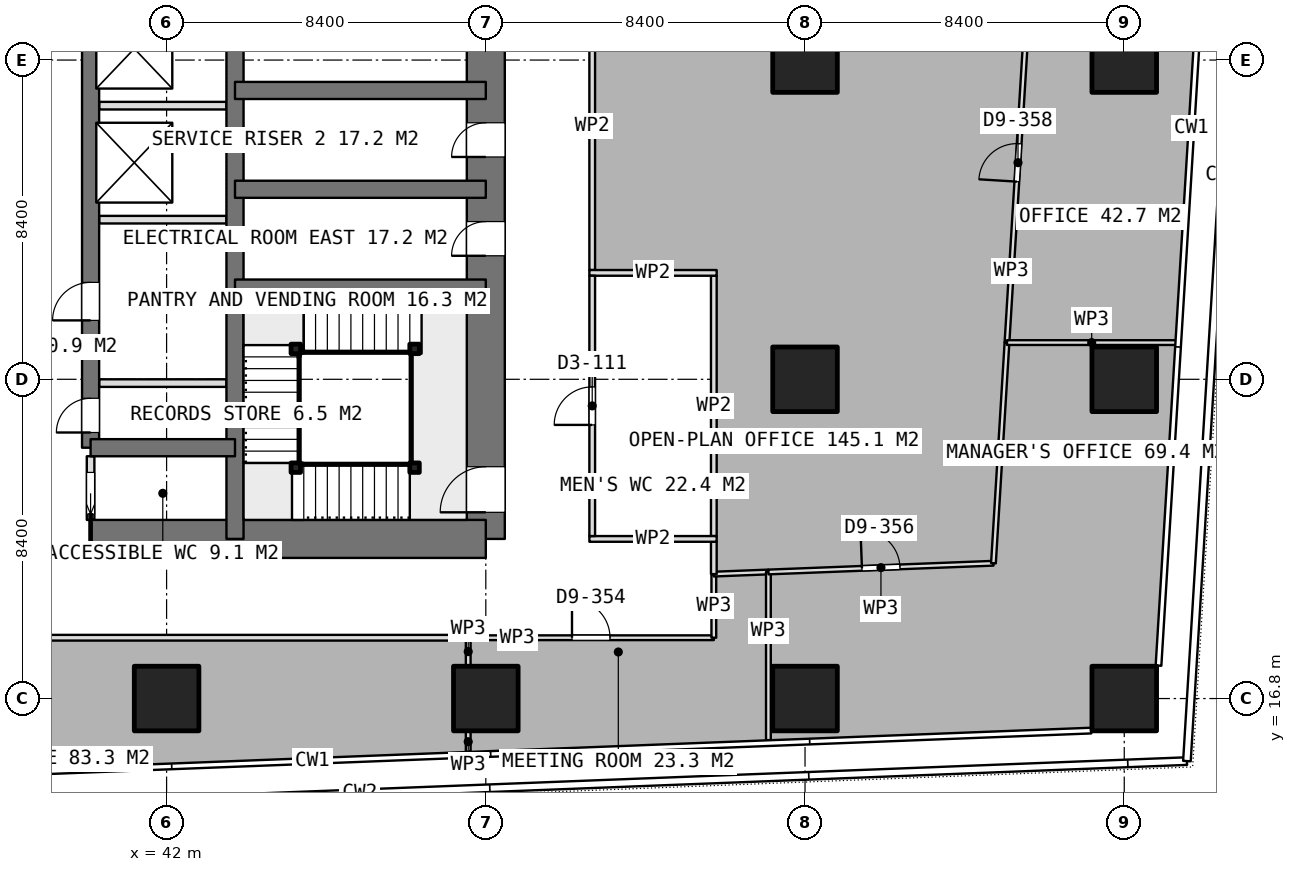
"""IFC4 building model, lengths in metres.
Left out: names, types, materials, properties, quantities, classifications, styles, units other than length and angle.
Written with IfcOpenShell. Run it as: python <this file> out.ifc"""

import sys

from ifc_helpers import new_model, si_unit, direction, frame, frame_2d, origin, origin_2d, place, context, subcontext, project, spatial, rectangle, extrude, element, fill, save


model = new_model("IFC4")
c1 = context("Model", 3, precision=1e-05, world=origin(), true_north=direction((0.0, 1.0)))
c2 = subcontext(c1, "Body", "Model", "MODEL_VIEW")
j1 = project(units=[si_unit("LENGTHUNIT", "METRE"), si_unit("PLANEANGLEUNIT", "RADIAN")], contexts=[c1])
p1 = place(None, origin())
s1 = spatial("IfcSite", under=j1, at=p1, CompositionType="ELEMENT")
p2 = place(p1, origin())
s2 = spatial("IfcBuilding", under=s1, at=p2, CompositionType="ELEMENT")
p3 = place(p2, frame((0.0, 0.0, 106.55)))
s3 = spatial("IfcBuildingStorey", under=s2, at=p3, CompositionType="ELEMENT", Elevation=106.55)
p4 = place(p3, frame((40.0, 21.0, 0.0), z_axis=(0.0, 0.0, 1.0), x_axis=(1.0, 0.0, 0.0)))
e1 = element("IfcWall", 1, at=p4, inside=s3, PredefinedType="SHEAR", context=c2, shape_type="SweptSolid", body=[
    extrude(rectangle(XDim=10.4, YDim=1.0, at=frame_2d((5.2, 0.0))), origin(), (0.0, 0.0, 1.0), 3.75),
])
p5 = place(p3, frame((50.4, 21.0, 0.0), z_axis=(0.0, 0.0, 1.0), x_axis=(0.0, 1.0, 0.0)))
e2 = element("IfcWall", 2, at=p5, inside=s3, PredefinedType="SHEAR", context=c2, shape_type="SweptSolid", body=[
    extrude(rectangle(XDim=25.2, YDim=1.0, at=frame_2d((12.6, 0.0))), origin(), (0.0, 0.0, 1.0), 3.75),
])
p6 = place(p5, frame((16.2, 0.0, 0.0)))
e3 = element("IfcOpeningElement", 3, at=p6, cuts=e2, PredefinedType="OPENING", context=c2, shape_type="SweptSolid", body=[
    extrude(rectangle(XDim=1.2, YDim=2.1, at=frame_2d((0.6, 1.05))), frame((0.0, 0.51, 0.0), z_axis=(0.0, -1.0, 0.0), x_axis=(1.0, 0.0, 0.0)), (0.0, 0.0, 1.0), 1.02),
])
p7 = place(p5, frame((10.05, 0.0, 0.0)))
e4 = element("IfcOpeningElement", 4, at=p7, cuts=e2, PredefinedType="OPENING", context=c2, shape_type="SweptSolid", body=[
    extrude(rectangle(XDim=0.9, YDim=2.1, at=frame_2d((0.45, 1.05))), frame((0.0, 0.51, 0.0), z_axis=(0.0, -1.0, 0.0), x_axis=(1.0, 0.0, 0.0)), (0.0, 0.0, 1.0), 1.02),
])
p8 = place(p5, frame((7.45, 0.0, 0.0)))
e5 = element("IfcOpeningElement", 5, at=p8, cuts=e2, PredefinedType="OPENING", context=c2, shape_type="SweptSolid", body=[
    extrude(rectangle(XDim=0.9, YDim=2.1, at=frame_2d((0.45, 1.05))), frame((0.0, 0.51, 0.0), z_axis=(0.0, -1.0, 0.0), x_axis=(1.0, 0.0, 0.0)), (0.0, 0.0, 1.0), 1.02),
])
p9 = place(p5, frame((0.7, 0.0, 0.0)))
e6 = element("IfcOpeningElement", 6, at=p9, cuts=e2, PredefinedType="OPENING", context=c2, shape_type="SweptSolid", body=[
    extrude(rectangle(XDim=1.2, YDim=2.1, at=frame_2d((0.6, 1.05))), frame((0.0, 0.51, 0.0), z_axis=(0.0, -1.0, 0.0), x_axis=(1.0, 0.0, 0.0)), (0.0, 0.0, 1.0), 1.02),
])
p10 = place(p3, frame((43.8, 21.0, 0.0), z_axis=(0.0, 0.0, 1.0), x_axis=(0.0, 1.0, 0.0)))
e7 = element("IfcWall", 7, at=p10, inside=s3, PredefinedType="SHEAR", context=c2, shape_type="SweptSolid", body=[
    extrude(rectangle(XDim=25.2, YDim=0.45, at=frame_2d((12.6, 0.0))), origin(), (0.0, 0.0, 1.0), 3.75),
])
p11 = place(p3, frame((40.0, 23.4, 0.0), z_axis=(0.0, 0.0, 1.0), x_axis=(0.0, 1.0, 0.0)))
e8 = element("IfcWall", 8, at=p11, inside=s3, PredefinedType="SHEAR", context=c2, shape_type="SweptSolid", body=[
    extrude(rectangle(XDim=18.0, YDim=0.45, at=frame_2d((9.0, 0.0))), origin(), (0.0, 0.0, 1.0), 3.75),
])
p12 = place(p11, frame((0.4, 0.0, 0.0)))
e9 = element("IfcOpeningElement", 9, at=p12, cuts=e8, PredefinedType="OPENING", context=c2, shape_type="SweptSolid", body=[
    extrude(rectangle(XDim=0.9, YDim=2.1, at=frame_2d((0.45, 1.05))), frame((0.0, 0.235, 0.0), z_axis=(0.0, -1.0, 0.0), x_axis=(1.0, 0.0, 0.0)), (0.0, 0.0, 1.0), 0.47),
])
p13 = place(p11, frame((3.35, 0.0, 0.0)))
e10 = element("IfcOpeningElement", 10, at=p13, cuts=e8, PredefinedType="OPENING", context=c2, shape_type="SweptSolid", body=[
    extrude(rectangle(XDim=1.0, YDim=2.1, at=frame_2d((0.5, 1.05))), frame((0.0, 0.235, 0.0), z_axis=(0.0, -1.0, 0.0), x_axis=(1.0, 0.0, 0.0)), (0.0, 0.0, 1.0), 0.47),
])
p14 = place(p3, frame((40.0, 23.4, 0.0), z_axis=(0.0, 0.0, 1.0), x_axis=(1.0, 0.0, 0.0)))
e11 = element("IfcWall", 11, at=p14, inside=s3, PredefinedType="SHEAR", context=c2, shape_type="SweptSolid", body=[
    extrude(rectangle(XDim=3.8, YDim=0.45, at=frame_2d((1.9, 0.0))), origin(), (0.0, 0.0, 1.0), 3.75),
])
for number, where, z_axis, x_axis in (
    (12, (43.8, 27.6, 0.0), (0.0, 0.0, 1.0), (1.0, 0.0, 0.0)),
    (13, (43.8, 30.2, 0.0), (0.0, 0.0, 1.0), (1.0, 0.0, 0.0)),
    (14, (43.8, 32.8, 0.0), (0.0, 0.0, 1.0), (1.0, 0.0, 0.0)),
):
    element("IfcWall", number, at=place(p3, frame(where, z_axis=z_axis, x_axis=x_axis)), inside=s3, PredefinedType="SHEAR", context=c2, shape_type="SweptSolid", body=[
        extrude(rectangle(XDim=6.6, YDim=0.45, at=frame_2d((3.3, 0.0))), origin(), (0.0, 0.0, 1.0), 3.75),
    ])
for number, where, z_axis, x_axis in (
    (15, (42.0, 16.8, 0.0), (0.0, 0.0, 1.0), (1.0, 0.0, 0.0)),
    (16, (50.4, 16.8, 0.0), (0.0, 0.0, 1.0), (1.0, 0.0, 0.0)),
    (17, (58.8, 16.8, 0.0), (0.0, 0.0, 1.0), (1.0, 0.0, 0.0)),
    (18, (58.8, 25.2, 0.0), (0.0, 0.0, 1.0), (1.0, 0.0, 0.0)),
    (19, (58.8, 33.6, 0.0), (0.0, 0.0, 1.0), (1.0, 0.0, 0.0)),
    (20, (67.2, 16.8, 0.0), (0.0, 0.0, 1.0), (1.0, 0.0, 0.0)),
    (21, (67.2, 25.2, 0.0), (0.0, 0.0, 1.0), (1.0, 0.0, 0.0)),
    (22, (67.2, 33.6, 0.0), (0.0, 0.0, 1.0), (1.0, 0.0, 0.0)),
):
    element("IfcColumn", number, at=place(p3, frame(where, z_axis=z_axis, x_axis=x_axis)), inside=s3, PredefinedType="COLUMN", context=c2, shape_type="SweptSolid", body=[
        extrude(rectangle(XDim=1.7, YDim=1.7, at=origin_2d()), origin(), (0.0, 0.0, 1.0), 3.75),
    ])
for number, where, z_axis, x_axis in (
    (23, (40.225, 29.4, 0.0), (0.0, 0.0, 1.0), (1.0, 0.0, 0.0)),
    (24, (40.225, 32.4, 0.0), (0.0, 0.0, 1.0), (1.0, 0.0, 0.0)),
):
    element("IfcWall", number, at=place(p3, frame(where, z_axis=z_axis, x_axis=x_axis)), inside=s3, PredefinedType="PARTITIONING", context=c2, shape_type="SweptSolid", body=[
        extrude(rectangle(XDim=3.35, YDim=0.2, at=frame_2d((1.675, 0.0))), origin(), (0.0, 0.0, 1.0), 3.5),
    ])
p15 = place(p3, frame((40.0, 21.5, 0.0), z_axis=(0.0, 0.0, 1.0), x_axis=(0.0, 1.0, 0.0)))
e25 = element("IfcWall", 25, at=p15, inside=s3, PredefinedType="PARTITIONING", context=c2, shape_type="SweptSolid", body=[
    extrude(rectangle(XDim=1.675, YDim=0.2, at=frame_2d((0.837, 0.0))), origin(), (0.0, 0.0, 1.0), 3.5),
])
p16 = place(p15, frame((0.15, 0.0, 0.0)))
e26 = element("IfcOpeningElement", 26, at=p16, cuts=e25, PredefinedType="OPENING", context=c2, shape_type="SweptSolid", body=[
    extrude(rectangle(XDim=1.1, YDim=2.1, at=frame_2d((0.55, 1.05))), frame((0.0, 0.11, 0.0), z_axis=(0.0, -1.0, 0.0), x_axis=(1.0, 0.0, 0.0)), (0.0, 0.0, 1.0), 0.22),
])
p17 = place(p3, frame((40.225, 25.1, 0.0), z_axis=(0.0, 0.0, 1.0), x_axis=(1.0, 0.0, 0.0)))
e27 = element("IfcWall", 27, at=p17, inside=s3, PredefinedType="PARTITIONING", context=c2, shape_type="SweptSolid", body=[
    extrude(rectangle(XDim=3.35, YDim=0.2, at=frame_2d((1.675, 0.0))), origin(), (0.0, 0.0, 1.0), 3.5),
])
for number, where, z_axis, x_axis in (
    (28, (53.125, 21.0, 0.0), (0.0, 0.0, 1.0), (1.0, 0.0, 0.0)),
    (29, (53.125, 28.0, 0.0), (0.0, 0.0, 1.0), (1.0, 0.0, 0.0)),
):
    element("IfcWall", number, at=place(p3, frame(where, z_axis=z_axis, x_axis=x_axis)), inside=s3, PredefinedType="PARTITIONING", context=c2, shape_type="SweptSolid", body=[
        extrude(rectangle(XDim=3.35, YDim=0.15, at=frame_2d((1.675, 0.0))), origin(), (0.0, 0.0, 1.0), 3.5),
    ])
p18 = place(p3, frame((53.2, 21.075, 0.0), z_axis=(0.0, 0.0, 1.0), x_axis=(0.0, 1.0, 0.0)))
e30 = element("IfcWall", 30, at=p18, inside=s3, PredefinedType="PARTITIONING", context=c2, shape_type="SweptSolid", body=[
    extrude(rectangle(XDim=6.85, YDim=0.15, at=frame_2d((3.425, 0.0))), origin(), (0.0, 0.0, 1.0), 3.5),
])
p19 = place(p18, frame((2.925, 0.0, 0.0)))
e31 = element("IfcOpeningElement", 31, at=p19, cuts=e30, PredefinedType="OPENING", context=c2, shape_type="SweptSolid", body=[
    extrude(rectangle(XDim=1.0, YDim=2.1, at=frame_2d((0.5, 1.05))), frame((0.0, 0.085, 0.0), z_axis=(0.0, -1.0, 0.0), x_axis=(1.0, 0.0, 0.0)), (0.0, 0.0, 1.0), 0.17),
])
p20 = place(p3, frame((56.4, 21.075, 0.0), z_axis=(0.0, 0.0, 1.0), x_axis=(0.0, 1.0, 0.0)))
e32 = element("IfcWall", 32, at=p20, inside=s3, PredefinedType="PARTITIONING", context=c2, shape_type="SweptSolid", body=[
    extrude(rectangle(XDim=6.85, YDim=0.15, at=frame_2d((3.425, 0.0))), origin(), (0.0, 0.0, 1.0), 3.5),
])
p21 = place(p3, frame((49.937, 18.4, 0.0), z_axis=(0.0, 0.0, 1.0), x_axis=(1.0, 0.0, 0.0)))
e33 = element("IfcWall", 33, at=p21, inside=s3, PredefinedType="PARTITIONING", context=c2, shape_type="SweptSolid", body=[
    extrude(rectangle(XDim=6.463, YDim=0.125, at=frame_2d((3.231, 0.0))), origin(), (0.0, 0.0, 1.0), 3.5),
])
p22 = place(p21, frame((2.731, 0.0, 0.0)))
e34 = element("IfcOpeningElement", 34, at=p22, cuts=e33, PredefinedType="OPENING", context=c2, shape_type="SweptSolid", body=[
    extrude(rectangle(XDim=1.0, YDim=2.1, at=frame_2d((0.5, 1.05))), frame((0.0, 0.073, 0.0), z_axis=(0.0, -1.0, 0.0), x_axis=(1.0, 0.0, 0.0)), (0.0, 0.0, 1.0), 0.145),
])
p23 = place(p3, frame((56.4, 18.4, 0.0), z_axis=(0.0, 0.0, 1.0), x_axis=(0.0, 1.0, 0.0)))
e35 = element("IfcWall", 35, at=p23, inside=s3, PredefinedType="PARTITIONING", context=c2, shape_type="SweptSolid", body=[
    extrude(rectangle(XDim=1.674, YDim=0.125, at=frame_2d((0.837, 0.0))), origin(), (0.0, 0.0, 1.0), 3.5),
])
p24 = place(p3, frame((56.4, 20.074, 0.0), z_axis=(0.0, 0.0, 1.0), x_axis=(0.999242997058, 0.038902864047, 0.0)))
e36 = element("IfcWall", 36, at=p24, inside=s3, PredefinedType="PARTITIONING", context=c2, shape_type="SweptSolid", body=[
    extrude(rectangle(XDim=1.437, YDim=0.125, at=frame_2d((0.719, 0.0))), origin(), (0.0, 0.0, 1.0), 3.5),
])
p25 = place(p3, frame((57.836, 20.13, 0.0), z_axis=(0.0, 0.0, 1.0), x_axis=(0.0, -1.0, 0.0)))
e37 = element("IfcWall", 37, at=p25, inside=s3, PredefinedType="PARTITIONING", context=c2, shape_type="SweptSolid", body=[
    extrude(rectangle(XDim=4.424, YDim=0.125, at=frame_2d((2.212, 0.0))), origin(), (0.0, 0.0, 1.0), 3.5),
])
p26 = place(p3, frame((49.937, 15.399, 0.0), z_axis=(0.0, 0.0, 1.0), x_axis=(0.0, 1.0, 0.0)))
e38 = element("IfcWall", 38, at=p26, inside=s3, PredefinedType="PARTITIONING", context=c2, shape_type="SweptSolid", body=[
    extrude(rectangle(XDim=0.531, YDim=0.125, at=frame_2d((0.266, 0.0))), origin(), (0.0, 0.0, 1.0), 3.5),
])
p27 = place(p3, frame((49.937, 17.67, 0.0), z_axis=(0.0, 0.0, 1.0), x_axis=(0.0, 1.0, 0.0)))
e39 = element("IfcWall", 39, at=p27, inside=s3, PredefinedType="PARTITIONING", context=c2, shape_type="SweptSolid", body=[
    extrude(rectangle(XDim=0.73, YDim=0.125, at=frame_2d((0.365, 0.0))), origin(), (0.0, 0.0, 1.0), 3.5),
])
p28 = place(p3, frame((57.837, 20.13, 0.0), z_axis=(0.0, 0.0, 1.0), x_axis=(0.999244959279, 0.038852430487, 0.0)))
e40 = element("IfcWall", 40, at=p28, inside=s3, PredefinedType="PARTITIONING", context=c2, shape_type="SweptSolid", body=[
    extrude(rectangle(XDim=5.926, YDim=0.125, at=frame_2d((2.963, 0.0))), origin(), (0.0, 0.0, 1.0), 3.5),
])
p29 = place(p28, frame((2.463, 0.0, 0.0)))
e41 = element("IfcOpeningElement", 41, at=p29, cuts=e40, PredefinedType="OPENING", context=c2, shape_type="SweptSolid", body=[
    extrude(rectangle(XDim=1.0, YDim=2.1, at=frame_2d((0.5, 1.05))), frame((0.0, 0.073, 0.0), z_axis=(0.0, -1.0, 0.0), x_axis=(1.0, 0.0, 0.0)), (0.0, 0.0, 1.0), 0.145),
])
p30 = place(p3, frame((63.758, 20.36, 0.0), z_axis=(0.0, 0.0, 1.0), x_axis=(0.06119454608, 0.99812585756, 0.0)))
e42 = element("IfcWall", 42, at=p30, inside=s3, PredefinedType="PARTITIONING", context=c2, shape_type="SweptSolid", body=[
    extrude(rectangle(XDim=5.817, YDim=0.125, at=frame_2d((2.908, 0.0))), origin(), (0.0, 0.0, 1.0), 3.5),
])
p31 = place(p3, frame((64.114, 26.166, 0.0), z_axis=(0.0, 0.0, 1.0), x_axis=(1.0, 0.0, 0.0)))
e43 = element("IfcWall", 43, at=p31, inside=s3, PredefinedType="PARTITIONING", context=c2, shape_type="SweptSolid", body=[
    extrude(rectangle(XDim=4.458, YDim=0.125, at=frame_2d((2.229, 0.0))), origin(), (0.0, 0.0, 1.0), 3.5),
])
p32 = place(p3, frame((64.114, 26.167, 0.0), z_axis=(0.0, 0.0, 1.0), x_axis=(0.061165020441, 0.998127667322, 0.0)))
e44 = element("IfcWall", 44, at=p32, inside=s3, PredefinedType="PARTITIONING", context=c2, shape_type="SweptSolid", body=[
    extrude(rectangle(XDim=9.484, YDim=0.125, at=frame_2d((4.742, 0.0))), origin(), (0.0, 0.0, 1.0), 3.5),
])
p33 = place(p32, frame((4.242, 0.0, 0.0)))
e45 = element("IfcOpeningElement", 45, at=p33, cuts=e44, PredefinedType="OPENING", context=c2, shape_type="SweptSolid", body=[
    extrude(rectangle(XDim=1.0, YDim=2.1, at=frame_2d((0.5, 1.05))), frame((0.0, 0.073, 0.0), z_axis=(0.0, -1.0, 0.0), x_axis=(1.0, 0.0, 0.0)), (0.0, 0.0, 1.0), 0.145),
])
p34 = place(p3, frame((56.4, 20.074, 0.0), z_axis=(0.0, 0.0, 1.0), x_axis=(0.0, 1.0, 0.0)))
e46 = element("IfcWall", 46, at=p34, inside=s3, PredefinedType="PARTITIONING", context=c2, shape_type="SweptSolid", body=[
    extrude(rectangle(XDim=0.851, YDim=0.15, at=frame_2d((0.426, 0.0))), origin(), (0.0, 0.0, 1.0), 3.5),
])
p35 = place(p3, frame((53.2, 28.075, 0.0), z_axis=(0.0, 0.0, 1.0), x_axis=(0.0, 1.0, 0.0)))
e47 = element("IfcWall", 47, at=p35, inside=s3, PredefinedType="PARTITIONING", context=c2, shape_type="SweptSolid", body=[
    extrude(rectangle(XDim=7.562, YDim=0.15, at=frame_2d((3.781, 0.0))), origin(), (0.0, 0.0, 1.0), 3.5),
])
p36 = place(p3, frame((26.234, 18.4, 0.0), z_axis=(0.0, 0.0, 1.0), x_axis=(1.0, 0.0, 0.0)))
e48 = element("IfcWall", 48, at=p36, inside=s3, PredefinedType="PARTITIONING", context=c2, shape_type="SweptSolid", body=[
    extrude(rectangle(XDim=23.702, YDim=0.15, at=frame_2d((11.851, 0.0))), origin(), (0.0, 0.0, 1.0), 3.5),
])
p37 = place(p36, frame((11.351, 0.0, 0.0)))
e49 = element("IfcOpeningElement", 49, at=p37, cuts=e48, PredefinedType="OPENING", context=c2, shape_type="SweptSolid", body=[
    extrude(rectangle(XDim=1.0, YDim=2.1, at=frame_2d((0.5, 1.05))), frame((0.0, 0.085, 0.0), z_axis=(0.0, -1.0, 0.0), x_axis=(1.0, 0.0, 0.0)), (0.0, 0.0, 1.0), 0.17),
])
for number, where, z_axis, x_axis in (
    (50, (48.525, 22.875, 0.0), (0.0, 0.0, 1.0), (1.0, 0.0, 0.0)),
    (51, (45.4, 22.875, 0.0), (0.0, 0.0, 1.0), (1.0, 0.0, 0.0)),
    (52, (45.4, 26.0, 0.0), (0.0, 0.0, 1.0), (1.0, 0.0, 0.0)),
    (53, (48.525, 26.0, 0.0), (0.0, 0.0, 1.0), (1.0, 0.0, 0.0)),
):
    element("IfcColumn", number, at=place(p3, frame(where, z_axis=z_axis, x_axis=x_axis)), inside=s3, PredefinedType="COLUMN", context=c2, shape_type="SweptSolid", body=[
        extrude(rectangle(XDim=0.25, YDim=0.25, at=origin_2d()), origin(), (0.0, 0.0, 1.0), 3.75),
    ])
p38 = place(p7, origin())
e54 = element("IfcDoor", 54, at=p38, inside=s3, OperationType="SINGLE_SWING_LEFT", PredefinedType="DOOR", context=c2, shape_type="SweptSolid", body=[
    extrude(rectangle(XDim=0.9, YDim=2.1, at=frame_2d((0.45, 1.05))), frame((0.0, 0.025, 0.0), z_axis=(0.0, -1.0, 0.0), x_axis=(1.0, 0.0, 0.0)), (0.0, 0.0, 1.0), 0.05),
])
fill(e4, e54)
p39 = place(p8, origin())
e55 = element("IfcDoor", 55, at=p39, inside=s3, OperationType="SINGLE_SWING_LEFT", PredefinedType="DOOR", context=c2, shape_type="SweptSolid", body=[
    extrude(rectangle(XDim=0.9, YDim=2.1, at=frame_2d((0.45, 1.05))), frame((0.0, 0.025, 0.0), z_axis=(0.0, -1.0, 0.0), x_axis=(1.0, 0.0, 0.0)), (0.0, 0.0, 1.0), 0.05),
])
fill(e5, e55)
p40 = place(p16, origin())
e56 = element("IfcDoor", 56, at=p40, inside=s3, OperationType="SLIDING_TO_LEFT", PredefinedType="DOOR", context=c2, shape_type="SweptSolid", body=[
    extrude(rectangle(XDim=1.1, YDim=2.1, at=frame_2d((0.55, 1.05))), frame((0.0, 0.025, 0.0), z_axis=(0.0, -1.0, 0.0), x_axis=(1.0, 0.0, 0.0)), (0.0, 0.0, 1.0), 0.05),
])
fill(e26, e56)
p41 = place(p12, origin())
e57 = element("IfcDoor", 57, at=p41, inside=s3, OperationType="SINGLE_SWING_LEFT", PredefinedType="DOOR", context=c2, shape_type="SweptSolid", body=[
    extrude(rectangle(XDim=0.9, YDim=2.1, at=frame_2d((0.45, 1.05))), frame((0.0, 0.025, 0.0), z_axis=(0.0, -1.0, 0.0), x_axis=(1.0, 0.0, 0.0)), (0.0, 0.0, 1.0), 0.05),
])
fill(e9, e57)
p42 = place(p13, origin())
e58 = element("IfcDoor", 58, at=p42, inside=s3, OperationType="SINGLE_SWING_LEFT", PredefinedType="DOOR", context=c2, shape_type="SweptSolid", body=[
    extrude(rectangle(XDim=1.0, YDim=2.1, at=frame_2d((0.5, 1.05))), frame((0.0, 0.025, 0.0), z_axis=(0.0, -1.0, 0.0), x_axis=(1.0, 0.0, 0.0)), (0.0, 0.0, 1.0), 0.05),
])
fill(e10, e58)
p43 = place(p19, origin())
e59 = element("IfcDoor", 59, at=p43, inside=s3, OperationType="SINGLE_SWING_LEFT", PredefinedType="DOOR", context=c2, shape_type="SweptSolid", body=[
    extrude(rectangle(XDim=1.0, YDim=2.1, at=frame_2d((0.5, 1.05))), frame((0.0, 0.025, 0.0), z_axis=(0.0, -1.0, 0.0), x_axis=(1.0, 0.0, 0.0)), (0.0, 0.0, 1.0), 0.05),
])
fill(e31, e59)
p44 = place(p22, origin())
e60 = element("IfcDoor", 60, at=p44, inside=s3, OperationType="SINGLE_SWING_LEFT", PredefinedType="DOOR", context=c2, shape_type="SweptSolid", body=[
    extrude(rectangle(XDim=1.0, YDim=2.1, at=frame_2d((0.5, 1.05))), frame((0.0, 0.025, 0.0), z_axis=(0.0, -1.0, 0.0), x_axis=(1.0, 0.0, 0.0)), (0.0, 0.0, 1.0), 0.05),
])
fill(e34, e60)
p45 = place(p29, origin())
e61 = element("IfcDoor", 61, at=p45, inside=s3, OperationType="SINGLE_SWING_LEFT", PredefinedType="DOOR", context=c2, shape_type="SweptSolid", body=[
    extrude(rectangle(XDim=1.0, YDim=2.1, at=frame_2d((0.5, 1.05))), frame((0.0, 0.025, 0.0), z_axis=(0.0, -1.0, 0.0), x_axis=(1.0, 0.0, 0.0)), (0.0, 0.0, 1.0), 0.05),
])
fill(e41, e61)
p46 = place(p33, origin())
e62 = element("IfcDoor", 62, at=p46, inside=s3, OperationType="SINGLE_SWING_LEFT", PredefinedType="DOOR", context=c2, shape_type="SweptSolid", body=[
    extrude(rectangle(XDim=1.0, YDim=2.1, at=frame_2d((0.5, 1.05))), frame((0.0, 0.025, 0.0), z_axis=(0.0, -1.0, 0.0), x_axis=(1.0, 0.0, 0.0)), (0.0, 0.0, 1.0), 0.05),
])
fill(e45, e62)
p47 = place(p9, origin())
e63 = element("IfcDoor", 63, at=p47, inside=s3, OperationType="SINGLE_SWING_RIGHT", PredefinedType="DOOR", context=c2, shape_type="SweptSolid", body=[
    extrude(rectangle(XDim=1.2, YDim=2.1, at=frame_2d((0.6, 1.05))), frame((0.0, 0.025, 0.0), z_axis=(0.0, -1.0, 0.0), x_axis=(1.0, 0.0, 0.0)), (0.0, 0.0, 1.0), 0.05),
])
fill(e6, e63)
save(model, sys.argv[1])
